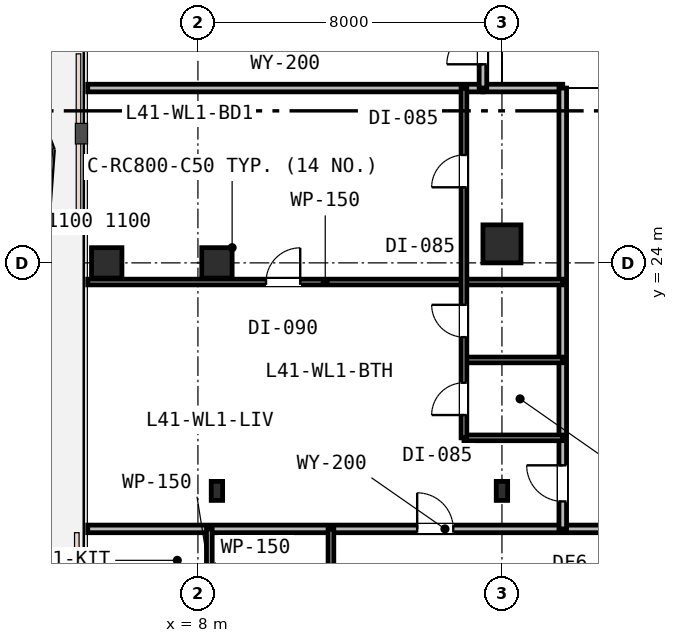
"""IFC4 building model, lengths in metres.
Left out: names, types, materials, properties, quantities, classifications, styles, units other than length and angle.
Written with IfcOpenShell. Run it as: python <this file> out.ifc"""

import sys

from ifc_helpers import new_model, si_unit, direction, frame, frame_2d, origin, origin_2d, place, context, subcontext, project, spatial, rectangle, i_section, extrude, element, fill, save


model = new_model("IFC4")
c1 = context("Model", 3, precision=1e-05, world=origin(), true_north=direction((0.0, 1.0)))
c2 = subcontext(c1, "Body", "Model", "MODEL_VIEW")
j1 = project(units=[si_unit("LENGTHUNIT", "METRE"), si_unit("PLANEANGLEUNIT", "RADIAN")], contexts=[c1])
p1 = place(None, origin())
s1 = spatial("IfcSite", under=j1, at=p1, CompositionType="ELEMENT")
p2 = place(p1, origin())
s2 = spatial("IfcBuilding", under=s1, at=p2, CompositionType="ELEMENT")
p3 = place(p2, frame((0.0, 0.0, 161.4)))
s3 = spatial("IfcBuildingStorey", under=s2, at=p3, CompositionType="ELEMENT", Elevation=161.4)
p4 = place(p3, frame((8.5, 24.0, 0.0), z_axis=(0.0, 0.0, 1.0), x_axis=(1.0, 0.0, 0.0)))
e1 = element("IfcColumn", 1, at=p4, inside=s3, PredefinedType="COLUMN", context=c2, shape_type="SweptSolid", body=[
    extrude(rectangle(XDim=0.8, YDim=0.8, at=origin_2d()), origin(), (0.0, 0.0, 1.0), 3.6),
])
p5 = place(p3, frame((16.0, 24.5, 0.0), z_axis=(0.0, 0.0, 1.0), x_axis=(1.0, 0.0, 0.0)))
e2 = element("IfcColumn", 2, at=p5, inside=s3, PredefinedType="COLUMN", context=c2, shape_type="SweptSolid", body=[
    extrude(rectangle(XDim=1.0, YDim=1.0, at=origin_2d()), origin(), (0.0, 0.0, 1.0), 3.6),
])
p6 = place(p3, frame((5.6, 24.0, 0.0), z_axis=(0.0, 0.0, 1.0), x_axis=(1.0, 0.0, 0.0)))
e3 = element("IfcColumn", 3, at=p6, inside=s3, PredefinedType="COLUMN", context=c2, shape_type="SweptSolid", body=[
    extrude(rectangle(XDim=0.8, YDim=0.8, at=origin_2d()), origin(), (0.0, 0.0, 1.0), 3.6),
])
for number, where, z_axis, x_axis in (
    (4, (8.5, 18.0, 0.0), (0.0, 0.0, 1.0), (1.0, 0.0, 0.0)),
    (5, (16.0, 18.0, 0.0), (0.0, 0.0, 1.0), (1.0, 0.0, 0.0)),
):
    element("IfcColumn", number, at=place(p3, frame(where, z_axis=z_axis, x_axis=x_axis)), inside=s3, PredefinedType="COLUMN", context=c2, shape_type="SweptSolid", body=[
        extrude(i_section(OverallWidth=0.3, OverallDepth=0.5, WebThickness=0.015, FlangeThickness=0.028, FilletRadius=0.027, at=origin_2d()), origin(), (0.0, 0.0, 1.0), 3.6),
    ])
p7 = place(p3, frame((5.1, 28.6, 0.0), z_axis=(0.0, 0.0, 1.0), x_axis=(1.0, 0.0, 0.0)))
e6 = element("IfcWall", 6, at=p7, inside=s3, PredefinedType="PARTITIONING", context=c2, shape_type="SweptSolid", body=[
    extrude(rectangle(XDim=10.4, YDim=0.2, at=frame_2d((5.2, 0.0))), origin(), (0.0, 0.0, 1.0), 2.93),
])
p8 = place(p3, frame((15.5, 28.6, 0.0), z_axis=(0.0, 0.0, 1.0), x_axis=(1.0, 0.0, 0.0)))
e7 = element("IfcWall", 7, at=p8, inside=s3, PredefinedType="PARTITIONING", context=c2, shape_type="SweptSolid", body=[
    extrude(rectangle(XDim=2.1, YDim=0.2, at=frame_2d((1.05, 0.0))), origin(), (0.0, 0.0, 1.0), 2.93),
])
p9 = place(p3, frame((15.5, 28.6, 0.0), z_axis=(0.0, 0.0, 1.0), x_axis=(0.0, 1.0, 0.0)))
e8 = element("IfcWall", 8, at=p9, inside=s3, PredefinedType="PARTITIONING", context=c2, shape_type="SweptSolid", body=[
    extrude(rectangle(XDim=14.3, YDim=0.2, at=frame_2d((7.15, 0.0))), origin(), (0.0, 0.0, 1.0), 2.93),
])
p10 = place(p9, frame((0.625, 0.0, 0.0)))
e9 = element("IfcOpeningElement", 9, at=p10, cuts=e8, PredefinedType="OPENING", context=c2, shape_type="SweptSolid", body=[
    extrude(rectangle(XDim=0.95, YDim=2.15, at=frame_2d((0.475, 1.075))), frame((0.0, 0.11, 0.0), z_axis=(0.0, -1.0, 0.0), x_axis=(1.0, 0.0, 0.0)), (0.0, 0.0, 1.0), 0.22),
])
p11 = place(p3, frame((5.1, 17.0, 0.0), z_axis=(0.0, 0.0, 1.0), x_axis=(1.0, 0.0, 0.0)))
e10 = element("IfcWall", 10, at=p11, inside=s3, PredefinedType="PARTITIONING", context=c2, shape_type="SweptSolid", body=[
    extrude(rectangle(XDim=18.8, YDim=0.2, at=frame_2d((9.4, 0.0))), origin(), (0.0, 0.0, 1.0), 2.93),
])
p12 = place(p11, frame((8.669, 0.0, 0.0)))
e11 = element("IfcOpeningElement", 11, at=p12, cuts=e10, PredefinedType="OPENING", context=c2, shape_type="SweptSolid", body=[
    extrude(rectangle(XDim=0.95, YDim=2.15, at=frame_2d((0.475, 1.075))), frame((0.0, 0.11, 0.0), z_axis=(0.0, -1.0, 0.0), x_axis=(1.0, 0.0, 0.0)), (0.0, 0.0, 1.0), 0.22),
])
p13 = place(p3, frame((17.6, 17.0, 0.0), z_axis=(0.0, 0.0, 1.0), x_axis=(0.0, 1.0, 0.0)))
e12 = element("IfcWall", 12, at=p13, inside=s3, PredefinedType="PARTITIONING", context=c2, shape_type="SweptSolid", body=[
    extrude(rectangle(XDim=11.6, YDim=0.2, at=frame_2d((5.8, 0.0))), origin(), (0.0, 0.0, 1.0), 2.93),
])
p14 = place(p13, frame((0.723, 0.0, 0.0)))
e13 = element("IfcOpeningElement", 13, at=p14, cuts=e12, PredefinedType="OPENING", context=c2, shape_type="SweptSolid", body=[
    extrude(rectangle(XDim=0.95, YDim=2.15, at=frame_2d((0.475, 1.075))), frame((0.0, 0.11, 0.0), z_axis=(0.0, -1.0, 0.0), x_axis=(1.0, 0.0, 0.0)), (0.0, 0.0, 1.0), 0.22),
])
for number, where, z_axis, x_axis in (
    (14, (15.0, 19.396, 0.0), (0.0, 0.0, 1.0), (1.0, 0.0, 0.0)),
    (15, (15.0, 21.446, 0.0), (0.0, 0.0, 1.0), (1.0, 0.0, 0.0)),
):
    element("IfcWall", number, at=place(p3, frame(where, z_axis=z_axis, x_axis=x_axis)), inside=s3, PredefinedType="PARTITIONING", context=c2, shape_type="SweptSolid", body=[
        extrude(rectangle(XDim=2.6, YDim=0.15, at=frame_2d((1.3, 0.0))), origin(), (0.0, 0.0, 1.0), 2.93),
    ])
p15 = place(p3, frame((5.1, 23.496, 0.0), z_axis=(0.0, 0.0, 1.0), x_axis=(1.0, 0.0, 0.0)))
e16 = element("IfcWall", 16, at=p15, inside=s3, PredefinedType="PARTITIONING", context=c2, shape_type="SweptSolid", body=[
    extrude(rectangle(XDim=12.5, YDim=0.15, at=frame_2d((6.25, 0.0))), origin(), (0.0, 0.0, 1.0), 2.93),
])
p16 = place(p15, frame((4.692, 0.0, 0.0)))
e17 = element("IfcOpeningElement", 17, at=p16, cuts=e16, PredefinedType="OPENING", context=c2, shape_type="SweptSolid", body=[
    extrude(rectangle(XDim=0.9, YDim=2.15, at=frame_2d((0.45, 1.075))), frame((0.0, 0.085, 0.0), z_axis=(0.0, -1.0, 0.0), x_axis=(1.0, 0.0, 0.0)), (0.0, 0.0, 1.0), 0.17),
])
p17 = place(p3, frame((15.0, 19.396, 0.0), z_axis=(0.0, 0.0, 1.0), x_axis=(0.0, 1.0, 0.0)))
e18 = element("IfcWall", 18, at=p17, inside=s3, PredefinedType="PARTITIONING", context=c2, shape_type="SweptSolid", body=[
    extrude(rectangle(XDim=9.204, YDim=0.15, at=frame_2d((4.602, 0.0))), origin(), (0.0, 0.0, 1.0), 2.93),
])
p18 = place(p17, frame((0.6, 0.0, 0.0)))
e19 = element("IfcOpeningElement", 19, at=p18, cuts=e18, PredefinedType="OPENING", context=c2, shape_type="SweptSolid", body=[
    extrude(rectangle(XDim=0.85, YDim=2.15, at=frame_2d((0.425, 1.075))), frame((0.0, 0.085, 0.0), z_axis=(0.0, -1.0, 0.0), x_axis=(1.0, 0.0, 0.0)), (0.0, 0.0, 1.0), 0.17),
])
p19 = place(p17, frame((2.65, 0.0, 0.0)))
e20 = element("IfcOpeningElement", 20, at=p19, cuts=e18, PredefinedType="OPENING", context=c2, shape_type="SweptSolid", body=[
    extrude(rectangle(XDim=0.85, YDim=2.15, at=frame_2d((0.425, 1.075))), frame((0.0, 0.085, 0.0), z_axis=(0.0, -1.0, 0.0), x_axis=(1.0, 0.0, 0.0)), (0.0, 0.0, 1.0), 0.17),
])
p20 = place(p17, frame((6.593, 0.0, 0.0)))
e21 = element("IfcOpeningElement", 21, at=p20, cuts=e18, PredefinedType="OPENING", context=c2, shape_type="SweptSolid", body=[
    extrude(rectangle(XDim=0.85, YDim=2.15, at=frame_2d((0.425, 1.075))), frame((0.0, 0.085, 0.0), z_axis=(0.0, -1.0, 0.0), x_axis=(1.0, 0.0, 0.0)), (0.0, 0.0, 1.0), 0.17),
])
p21 = place(p3, frame((11.5, 14.65, 0.0), z_axis=(0.0, 0.0, 1.0), x_axis=(0.0, 1.0, 0.0)))
e22 = element("IfcWall", 22, at=p21, inside=s3, PredefinedType="PARTITIONING", context=c2, shape_type="SweptSolid", body=[
    extrude(rectangle(XDim=2.35, YDim=0.15, at=frame_2d((1.175, 0.0))), origin(), (0.0, 0.0, 1.0), 2.96),
])
p22 = place(p3, frame((8.3, 14.65, 0.0), z_axis=(0.0, 0.0, 1.0), x_axis=(0.0, 1.0, 0.0)))
e23 = element("IfcWall", 23, at=p22, inside=s3, PredefinedType="PARTITIONING", context=c2, shape_type="SweptSolid", body=[
    extrude(rectangle(XDim=2.35, YDim=0.15, at=frame_2d((1.175, 0.0))), origin(), (0.0, 0.0, 1.0), 2.93),
])
p23 = place(p10, origin())
e24 = element("IfcDoor", 24, at=p23, inside=s3, OperationType="SINGLE_SWING_LEFT", PredefinedType="DOOR", context=c2, shape_type="SweptSolid", body=[
    extrude(rectangle(XDim=0.95, YDim=2.15, at=frame_2d((0.475, 1.075))), frame((0.0, 0.025, 0.0), z_axis=(0.0, -1.0, 0.0), x_axis=(1.0, 0.0, 0.0)), (0.0, 0.0, 1.0), 0.05),
])
fill(e9, e24)
p24 = place(p14, origin())
e25 = element("IfcDoor", 25, at=p24, inside=s3, OperationType="SINGLE_SWING_RIGHT", PredefinedType="DOOR", context=c2, shape_type="SweptSolid", body=[
    extrude(rectangle(XDim=0.95, YDim=2.15, at=frame_2d((0.475, 1.075))), frame((0.0, 0.025, 0.0), z_axis=(0.0, -1.0, 0.0), x_axis=(1.0, 0.0, 0.0)), (0.0, 0.0, 1.0), 0.05),
])
fill(e13, e25)
p25 = place(p18, origin())
e26 = element("IfcDoor", 26, at=p25, inside=s3, OperationType="SINGLE_SWING_LEFT", PredefinedType="DOOR", context=c2, shape_type="SweptSolid", body=[
    extrude(rectangle(XDim=0.85, YDim=2.15, at=frame_2d((0.425, 1.075))), frame((0.0, 0.025, 0.0), z_axis=(0.0, -1.0, 0.0), x_axis=(1.0, 0.0, 0.0)), (0.0, 0.0, 1.0), 0.05),
])
fill(e19, e26)
p26 = place(p19, origin())
e27 = element("IfcDoor", 27, at=p26, inside=s3, OperationType="SINGLE_SWING_RIGHT", PredefinedType="DOOR", context=c2, shape_type="SweptSolid", body=[
    extrude(rectangle(XDim=0.85, YDim=2.15, at=frame_2d((0.425, 1.075))), frame((0.0, 0.025, 0.0), z_axis=(0.0, -1.0, 0.0), x_axis=(1.0, 0.0, 0.0)), (0.0, 0.0, 1.0), 0.05),
])
fill(e20, e27)
p27 = place(p20, origin())
e28 = element("IfcDoor", 28, at=p27, inside=s3, OperationType="SINGLE_SWING_LEFT", PredefinedType="DOOR", context=c2, shape_type="SweptSolid", body=[
    extrude(rectangle(XDim=0.85, YDim=2.15, at=frame_2d((0.425, 1.075))), frame((0.0, 0.025, 0.0), z_axis=(0.0, -1.0, 0.0), x_axis=(1.0, 0.0, 0.0)), (0.0, 0.0, 1.0), 0.05),
])
fill(e21, e28)
p28 = place(p16, origin())
e29 = element("IfcDoor", 29, at=p28, inside=s3, OperationType="SINGLE_SWING_RIGHT", PredefinedType="DOOR", context=c2, shape_type="SweptSolid", body=[
    extrude(rectangle(XDim=0.9, YDim=2.15, at=frame_2d((0.45, 1.075))), frame((0.0, 0.025, 0.0), z_axis=(0.0, -1.0, 0.0), x_axis=(1.0, 0.0, 0.0)), (0.0, 0.0, 1.0), 0.05),
])
fill(e17, e29)
p29 = place(p12, origin())
e30 = element("IfcDoor", 30, at=p29, inside=s3, OperationType="SINGLE_SWING_LEFT", PredefinedType="DOOR", context=c2, shape_type="SweptSolid", body=[
    extrude(rectangle(XDim=0.95, YDim=2.15, at=frame_2d((0.475, 1.075))), frame((0.0, 0.025, 0.0), z_axis=(0.0, -1.0, 0.0), x_axis=(1.0, 0.0, 0.0)), (0.0, 0.0, 1.0), 0.05),
])
fill(e11, e30)
save(model, sys.argv[1])
